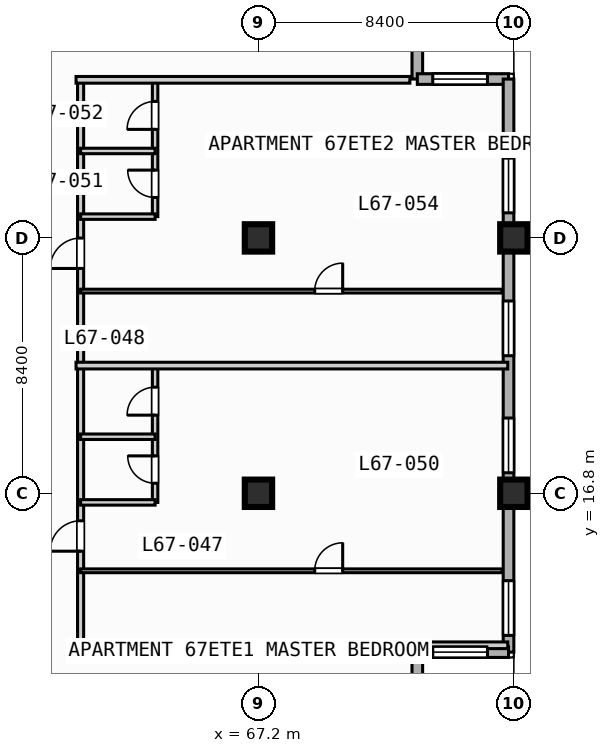
"""IFC4 building model, lengths in metres.
Left out: names, types, materials, properties, quantities, classifications, styles, units other than length and angle.
Written with IfcOpenShell. Run it as: python <this file> out.ifc"""

import sys

from ifc_helpers import new_model, si_unit, direction, frame, frame_2d, origin, origin_2d, place, context, subcontext, project, spatial, rectangle, extrude, element, fill, save


model = new_model("IFC4")
c1 = context("Model", 3, precision=1e-05, world=origin(), true_north=direction((0.0, 1.0)))
c2 = subcontext(c1, "Body", "Model", "MODEL_VIEW")
j1 = project(units=[si_unit("LENGTHUNIT", "METRE"), si_unit("PLANEANGLEUNIT", "RADIAN")], contexts=[c1])
p1 = place(None, origin())
s1 = spatial("IfcSite", under=j1, at=p1, CompositionType="ELEMENT")
p2 = place(p1, origin())
s2 = spatial("IfcBuilding", under=s1, at=p2, CompositionType="ELEMENT")
p3 = place(p2, frame((0.0, 0.0, 271.2)))
s3 = spatial("IfcBuildingStorey", under=s2, at=p3, CompositionType="ELEMENT", Elevation=271.2)
for number, where, z_axis, x_axis in (
    (1, (67.2, 16.8, 0.0), (0.0, 0.0, 1.0), (1.0, 0.0, 0.0)),
    (2, (67.2, 25.2, 0.0), (0.0, 0.0, 1.0), (1.0, 0.0, 0.0)),
    (3, (75.6, 16.8, 0.0), (0.0, 0.0, 1.0), (1.0, 0.0, 0.0)),
    (4, (75.6, 25.2, 0.0), (0.0, 0.0, 1.0), (1.0, 0.0, 0.0)),
):
    element("IfcColumn", number, at=place(p3, frame(where, z_axis=z_axis, x_axis=x_axis)), inside=s3, PredefinedType="COLUMN", context=c2, shape_type="SweptSolid", body=[
        extrude(rectangle(XDim=0.9, YDim=0.9, at=origin_2d()), origin(), (0.0, 0.0, 1.0), 3.7),
    ])
p4 = place(p3, frame((72.425, 33.425, 0.0), z_axis=(0.0, 0.0, 1.0), x_axis=(0.0, -1.0, 0.0)))
e5 = element("IfcWall", 5, at=p4, inside=s3, PredefinedType="STANDARD", context=c2, shape_type="SweptSolid", body=[
    extrude(rectangle(XDim=3.0, YDim=0.35, at=frame_2d((1.5, 0.0))), origin(), (0.0, 0.0, 1.0), 3.47),
])
p5 = place(p3, frame((72.425, 30.425, 0.0), z_axis=(0.0, 0.0, 1.0), x_axis=(1.0, 0.0, 0.0)))
e6 = element("IfcWall", 6, at=p5, inside=s3, PredefinedType="STANDARD", context=c2, shape_type="SweptSolid", body=[
    extrude(rectangle(XDim=3.0, YDim=0.35, at=frame_2d((1.5, 0.0))), origin(), (0.0, 0.0, 1.0), 3.47),
])
p6 = place(p5, frame((0.508, 0.0, 0.85)))
e7 = element("IfcOpeningElement", 7, at=p6, cuts=e6, PredefinedType="OPENING", context=c2, shape_type="SweptSolid", body=[
    extrude(rectangle(XDim=1.8, YDim=1.8, at=frame_2d((0.9, 0.9))), frame((0.0, 0.185, 0.0), z_axis=(0.0, -1.0, 0.0), x_axis=(1.0, 0.0, 0.0)), (0.0, 0.0, 1.0), 0.37),
])
p7 = place(p3, frame((75.425, 30.425, 0.0), z_axis=(0.0, 0.0, 1.0), x_axis=(0.0, -1.0, 0.0)))
e8 = element("IfcWall", 8, at=p7, inside=s3, PredefinedType="STANDARD", context=c2, shape_type="SweptSolid", body=[
    extrude(rectangle(XDim=18.85, YDim=0.35, at=frame_2d((9.425, 0.0))), origin(), (0.0, 0.0, 1.0), 3.47),
])
p8 = place(p7, frame((16.5, 0.0, 0.85)))
e9 = element("IfcOpeningElement", 9, at=p8, cuts=e8, PredefinedType="OPENING", context=c2, shape_type="SweptSolid", body=[
    extrude(rectangle(XDim=1.8, YDim=1.8, at=frame_2d((0.9, 0.9))), frame((0.0, 0.185, 0.0), z_axis=(0.0, -1.0, 0.0), x_axis=(1.0, 0.0, 0.0)), (0.0, 0.0, 1.0), 0.37),
])
p9 = place(p7, frame((11.15, 0.0, 0.85)))
e10 = element("IfcOpeningElement", 10, at=p9, cuts=e8, PredefinedType="OPENING", context=c2, shape_type="SweptSolid", body=[
    extrude(rectangle(XDim=1.8, YDim=1.8, at=frame_2d((0.9, 0.9))), frame((0.0, 0.185, 0.0), z_axis=(0.0, -1.0, 0.0), x_axis=(1.0, 0.0, 0.0)), (0.0, 0.0, 1.0), 0.37),
])
p10 = place(p7, frame((7.3, 0.0, 0.85)))
e11 = element("IfcOpeningElement", 11, at=p10, cuts=e8, PredefinedType="OPENING", context=c2, shape_type="SweptSolid", body=[
    extrude(rectangle(XDim=1.8, YDim=1.8, at=frame_2d((0.9, 0.9))), frame((0.0, 0.185, 0.0), z_axis=(0.0, -1.0, 0.0), x_axis=(1.0, 0.0, 0.0)), (0.0, 0.0, 1.0), 0.37),
])
p11 = place(p7, frame((2.6, 0.0, 0.85)))
e12 = element("IfcOpeningElement", 12, at=p11, cuts=e8, PredefinedType="OPENING", context=c2, shape_type="SweptSolid", body=[
    extrude(rectangle(XDim=1.8, YDim=1.8, at=frame_2d((0.9, 0.9))), frame((0.0, 0.185, 0.0), z_axis=(0.0, -1.0, 0.0), x_axis=(1.0, 0.0, 0.0)), (0.0, 0.0, 1.0), 0.37),
])
p12 = place(p3, frame((75.425, 11.575, 0.0), z_axis=(0.0, 0.0, 1.0), x_axis=(-1.0, 0.0, 0.0)))
e13 = element("IfcWall", 13, at=p12, inside=s3, PredefinedType="STANDARD", context=c2, shape_type="SweptSolid", body=[
    extrude(rectangle(XDim=3.0, YDim=0.35, at=frame_2d((1.5, 0.0))), origin(), (0.0, 0.0, 1.0), 3.47),
])
p13 = place(p12, frame((0.692, 0.0, 0.85)))
e14 = element("IfcOpeningElement", 14, at=p13, cuts=e13, PredefinedType="OPENING", context=c2, shape_type="SweptSolid", body=[
    extrude(rectangle(XDim=1.8, YDim=1.8, at=frame_2d((0.9, 0.9))), frame((0.0, 0.185, 0.0), z_axis=(0.0, -1.0, 0.0), x_axis=(1.0, 0.0, 0.0)), (0.0, 0.0, 1.0), 0.37),
])
p14 = place(p3, frame((72.425, 11.575, 0.0), z_axis=(0.0, 0.0, 1.0), x_axis=(0.0, -1.0, 0.0)))
e15 = element("IfcWall", 15, at=p14, inside=s3, PredefinedType="STANDARD", context=c2, shape_type="SweptSolid", body=[
    extrude(rectangle(XDim=3.0, YDim=0.35, at=frame_2d((1.5, 0.0))), origin(), (0.0, 0.0, 1.0), 3.47),
])
p15 = place(p3, frame((61.35, 11.8, 0.0), z_axis=(0.0, 0.0, 1.0), x_axis=(0.0, 1.0, 0.0)))
e16 = element("IfcWall", 16, at=p15, inside=s3, PredefinedType="PARTITIONING", context=c2, shape_type="SweptSolid", body=[
    extrude(rectangle(XDim=18.6, YDim=0.2, at=frame_2d((9.3, 0.0))), origin(), (0.0, 0.0, 1.0), 3.47),
])
p16 = place(p15, frame((3.095, 0.0, 0.0)))
e17 = element("IfcOpeningElement", 17, at=p16, cuts=e16, PredefinedType="OPENING", context=c2, shape_type="SweptSolid", body=[
    extrude(rectangle(XDim=1.0, YDim=2.15, at=frame_2d((0.5, 1.075))), frame((0.0, 0.11, 0.0), z_axis=(0.0, -1.0, 0.0), x_axis=(1.0, 0.0, 0.0)), (0.0, 0.0, 1.0), 0.22),
])
p17 = place(p15, frame((12.395, 0.0, 0.0)))
e18 = element("IfcOpeningElement", 18, at=p17, cuts=e16, PredefinedType="OPENING", context=c2, shape_type="SweptSolid", body=[
    extrude(rectangle(XDim=1.0, YDim=2.15, at=frame_2d((0.5, 1.075))), frame((0.0, 0.11, 0.0), z_axis=(0.0, -1.0, 0.0), x_axis=(1.0, 0.0, 0.0)), (0.0, 0.0, 1.0), 0.22),
])
p18 = place(p3, frame((61.2, 11.8, 0.0), z_axis=(0.0, 0.0, 1.0), x_axis=(1.0, 0.0, 0.0)))
e19 = element("IfcWall", 19, at=p18, inside=s3, PredefinedType="PARTITIONING", context=c2, shape_type="SweptSolid", body=[
    extrude(rectangle(XDim=14.2, YDim=0.22, at=frame_2d((7.1, 0.0))), origin(), (0.0, 0.0, 1.0), 3.47),
])
p19 = place(p3, frame((63.8, 16.5, 0.0), z_axis=(0.0, 0.0, 1.0), x_axis=(0.0, 1.0, 0.0)))
e20 = element("IfcWall", 20, at=p19, inside=s3, PredefinedType="PLUMBINGWALL", context=c2, shape_type="SweptSolid", body=[
    extrude(rectangle(XDim=4.5, YDim=0.18, at=frame_2d((2.25, 0.0))), origin(), (0.0, 0.0, 1.0), 3.47),
])
p20 = place(p19, frame((0.63, 0.0, 0.0)))
e21 = element("IfcOpeningElement", 21, at=p20, cuts=e20, PredefinedType="OPENING", context=c2, shape_type="SweptSolid", body=[
    extrude(rectangle(XDim=0.9, YDim=2.1, at=frame_2d((0.45, 1.05))), frame((0.0, 0.1, 0.0), z_axis=(0.0, -1.0, 0.0), x_axis=(1.0, 0.0, 0.0)), (0.0, 0.0, 1.0), 0.2),
])
p21 = place(p19, frame((2.87, 0.0, 0.0)))
e22 = element("IfcOpeningElement", 22, at=p21, cuts=e20, PredefinedType="OPENING", context=c2, shape_type="SweptSolid", body=[
    extrude(rectangle(XDim=0.92, YDim=2.1, at=frame_2d((0.46, 1.05))), frame((0.0, 0.1, 0.0), z_axis=(0.0, -1.0, 0.0), x_axis=(1.0, 0.0, 0.0)), (0.0, 0.0, 1.0), 0.2),
])
p22 = place(p3, frame((61.35, 16.5, 0.0), z_axis=(0.0, 0.0, 1.0), x_axis=(1.0, 0.0, 0.0)))
e23 = element("IfcWall", 23, at=p22, inside=s3, PredefinedType="PLUMBINGWALL", context=c2, shape_type="SweptSolid", body=[
    extrude(rectangle(XDim=2.45, YDim=0.18, at=frame_2d((1.225, 0.0))), origin(), (0.0, 0.0, 1.0), 2.82),
])
p23 = place(p3, frame((61.35, 18.66, 0.0), z_axis=(0.0, 0.0, 1.0), x_axis=(1.0, 0.0, 0.0)))
e24 = element("IfcWall", 24, at=p23, inside=s3, PredefinedType="PLUMBINGWALL", context=c2, shape_type="SweptSolid", body=[
    extrude(rectangle(XDim=2.45, YDim=0.18, at=frame_2d((1.225, 0.0))), origin(), (0.0, 0.0, 1.0), 3.47),
])
p24 = place(p3, frame((61.35, 14.25, 0.0), z_axis=(0.0, 0.0, 1.0), x_axis=(1.0, 0.0, 0.0)))
e25 = element("IfcWall", 25, at=p24, inside=s3, PredefinedType="PARTITIONING", context=c2, shape_type="SweptSolid", body=[
    extrude(rectangle(XDim=13.87, YDim=0.125, at=frame_2d((6.935, 0.0))), origin(), (0.0, 0.0, 1.0), 3.47),
])
p25 = place(p24, frame((7.7, 0.0, 0.0)))
e26 = element("IfcOpeningElement", 26, at=p25, cuts=e25, PredefinedType="OPENING", context=c2, shape_type="SweptSolid", body=[
    extrude(rectangle(XDim=0.92, YDim=2.1, at=frame_2d((0.46, 1.05))), frame((0.0, 0.073, 0.0), z_axis=(0.0, -1.0, 0.0), x_axis=(1.0, 0.0, 0.0)), (0.0, 0.0, 1.0), 0.145),
])
p26 = place(p3, frame((61.2, 21.0, 0.0), z_axis=(0.0, 0.0, 1.0), x_axis=(1.0, 0.0, 0.0)))
e27 = element("IfcWall", 27, at=p26, inside=s3, PredefinedType="PARTITIONING", context=c2, shape_type="SweptSolid", body=[
    extrude(rectangle(XDim=14.2, YDim=0.22, at=frame_2d((7.1, 0.0))), origin(), (0.0, 0.0, 1.0), 3.47),
])
p27 = place(p3, frame((63.8, 25.9, 0.0), z_axis=(0.0, 0.0, 1.0), x_axis=(0.0, 1.0, 0.0)))
e28 = element("IfcWall", 28, at=p27, inside=s3, PredefinedType="PLUMBINGWALL", context=c2, shape_type="SweptSolid", body=[
    extrude(rectangle(XDim=4.5, YDim=0.18, at=frame_2d((2.25, 0.0))), origin(), (0.0, 0.0, 1.0), 3.47),
])
p28 = place(p27, frame((0.63, 0.0, 0.0)))
e29 = element("IfcOpeningElement", 29, at=p28, cuts=e28, PredefinedType="OPENING", context=c2, shape_type="SweptSolid", body=[
    extrude(rectangle(XDim=0.9, YDim=2.1, at=frame_2d((0.45, 1.05))), frame((0.0, 0.1, 0.0), z_axis=(0.0, -1.0, 0.0), x_axis=(1.0, 0.0, 0.0)), (0.0, 0.0, 1.0), 0.2),
])
p29 = place(p27, frame((2.87, 0.0, 0.0)))
e30 = element("IfcOpeningElement", 30, at=p29, cuts=e28, PredefinedType="OPENING", context=c2, shape_type="SweptSolid", body=[
    extrude(rectangle(XDim=0.92, YDim=2.1, at=frame_2d((0.46, 1.05))), frame((0.0, 0.1, 0.0), z_axis=(0.0, -1.0, 0.0), x_axis=(1.0, 0.0, 0.0)), (0.0, 0.0, 1.0), 0.2),
])
for number, where, z_axis, x_axis in (
    (31, (61.35, 25.9, 0.0), (0.0, 0.0, 1.0), (1.0, 0.0, 0.0)),
    (32, (61.35, 28.06, 0.0), (0.0, 0.0, 1.0), (1.0, 0.0, 0.0)),
):
    element("IfcWall", number, at=place(p3, frame(where, z_axis=z_axis, x_axis=x_axis)), inside=s3, PredefinedType="PLUMBINGWALL", context=c2, shape_type="SweptSolid", body=[
        extrude(rectangle(XDim=2.45, YDim=0.18, at=frame_2d((1.225, 0.0))), origin(), (0.0, 0.0, 1.0), 3.47),
    ])
p30 = place(p3, frame((61.35, 23.45, 0.0), z_axis=(0.0, 0.0, 1.0), x_axis=(1.0, 0.0, 0.0)))
e33 = element("IfcWall", 33, at=p30, inside=s3, PredefinedType="PARTITIONING", context=c2, shape_type="SweptSolid", body=[
    extrude(rectangle(XDim=13.87, YDim=0.125, at=frame_2d((6.935, 0.0))), origin(), (0.0, 0.0, 1.0), 3.47),
])
p31 = place(p30, frame((7.7, 0.0, 0.0)))
e34 = element("IfcOpeningElement", 34, at=p31, cuts=e33, PredefinedType="OPENING", context=c2, shape_type="SweptSolid", body=[
    extrude(rectangle(XDim=0.92, YDim=2.1, at=frame_2d((0.46, 1.05))), frame((0.0, 0.073, 0.0), z_axis=(0.0, -1.0, 0.0), x_axis=(1.0, 0.0, 0.0)), (0.0, 0.0, 1.0), 0.145),
])
p32 = place(p3, frame((61.2, 30.4, 0.0), z_axis=(0.0, 0.0, 1.0), x_axis=(1.0, 0.0, 0.0)))
e35 = element("IfcWall", 35, at=p32, inside=s3, PredefinedType="PARTITIONING", context=c2, shape_type="SweptSolid", body=[
    extrude(rectangle(XDim=10.98, YDim=0.22, at=frame_2d((5.49, 0.0))), origin(), (0.0, 0.0, 1.0), 3.47),
])
p33 = place(p6, origin())
e36 = element("IfcWindow", 36, at=p33, inside=s3, PartitioningType="SINGLE_PANEL", PredefinedType="WINDOW", context=c2, shape_type="SweptSolid", body=[
    extrude(rectangle(XDim=1.8, YDim=1.8, at=frame_2d((0.9, 0.9))), frame((0.0, 0.03, 0.0), z_axis=(0.0, -1.0, 0.0), x_axis=(1.0, 0.0, 0.0)), (0.0, 0.0, 1.0), 0.06),
])
fill(e7, e36)
p34 = place(p8, origin())
e37 = element("IfcWindow", 37, at=p34, inside=s3, PartitioningType="SINGLE_PANEL", PredefinedType="WINDOW", context=c2, shape_type="SweptSolid", body=[
    extrude(rectangle(XDim=1.8, YDim=1.8, at=frame_2d((0.9, 0.9))), frame((0.0, 0.03, 0.0), z_axis=(0.0, -1.0, 0.0), x_axis=(1.0, 0.0, 0.0)), (0.0, 0.0, 1.0), 0.06),
])
fill(e9, e37)
p35 = place(p9, origin())
e38 = element("IfcWindow", 38, at=p35, inside=s3, PartitioningType="SINGLE_PANEL", PredefinedType="WINDOW", context=c2, shape_type="SweptSolid", body=[
    extrude(rectangle(XDim=1.8, YDim=1.8, at=frame_2d((0.9, 0.9))), frame((0.0, 0.03, 0.0), z_axis=(0.0, -1.0, 0.0), x_axis=(1.0, 0.0, 0.0)), (0.0, 0.0, 1.0), 0.06),
])
fill(e10, e38)
p36 = place(p10, origin())
e39 = element("IfcWindow", 39, at=p36, inside=s3, PartitioningType="SINGLE_PANEL", PredefinedType="WINDOW", context=c2, shape_type="SweptSolid", body=[
    extrude(rectangle(XDim=1.8, YDim=1.8, at=frame_2d((0.9, 0.9))), frame((0.0, 0.03, 0.0), z_axis=(0.0, -1.0, 0.0), x_axis=(1.0, 0.0, 0.0)), (0.0, 0.0, 1.0), 0.06),
])
fill(e11, e39)
p37 = place(p11, origin())
e40 = element("IfcWindow", 40, at=p37, inside=s3, PartitioningType="SINGLE_PANEL", PredefinedType="WINDOW", context=c2, shape_type="SweptSolid", body=[
    extrude(rectangle(XDim=1.8, YDim=1.8, at=frame_2d((0.9, 0.9))), frame((0.0, 0.03, 0.0), z_axis=(0.0, -1.0, 0.0), x_axis=(1.0, 0.0, 0.0)), (0.0, 0.0, 1.0), 0.06),
])
fill(e12, e40)
p38 = place(p13, origin())
e41 = element("IfcWindow", 41, at=p38, inside=s3, PartitioningType="SINGLE_PANEL", PredefinedType="WINDOW", context=c2, shape_type="SweptSolid", body=[
    extrude(rectangle(XDim=1.8, YDim=1.8, at=frame_2d((0.9, 0.9))), frame((0.0, 0.03, 0.0), z_axis=(0.0, -1.0, 0.0), x_axis=(1.0, 0.0, 0.0)), (0.0, 0.0, 1.0), 0.06),
])
fill(e14, e41)
p39 = place(p16, origin())
e42 = element("IfcDoor", 42, at=p39, inside=s3, OperationType="SINGLE_SWING_LEFT", PredefinedType="DOOR", context=c2, shape_type="SweptSolid", body=[
    extrude(rectangle(XDim=1.0, YDim=2.15, at=frame_2d((0.5, 1.075))), frame((0.0, 0.025, 0.0), z_axis=(0.0, -1.0, 0.0), x_axis=(1.0, 0.0, 0.0)), (0.0, 0.0, 1.0), 0.05),
])
fill(e17, e42)
p40 = place(p17, origin())
e43 = element("IfcDoor", 43, at=p40, inside=s3, OperationType="SINGLE_SWING_LEFT", PredefinedType="DOOR", context=c2, shape_type="SweptSolid", body=[
    extrude(rectangle(XDim=1.0, YDim=2.15, at=frame_2d((0.5, 1.075))), frame((0.0, 0.025, 0.0), z_axis=(0.0, -1.0, 0.0), x_axis=(1.0, 0.0, 0.0)), (0.0, 0.0, 1.0), 0.05),
])
fill(e18, e43)
p41 = place(p20, origin())
e44 = element("IfcDoor", 44, at=p41, inside=s3, OperationType="SINGLE_SWING_RIGHT", PredefinedType="DOOR", context=c2, shape_type="SweptSolid", body=[
    extrude(rectangle(XDim=0.9, YDim=2.1, at=frame_2d((0.45, 1.05))), frame((0.0, 0.025, 0.0), z_axis=(0.0, -1.0, 0.0), x_axis=(1.0, 0.0, 0.0)), (0.0, 0.0, 1.0), 0.05),
])
fill(e21, e44)
p42 = place(p21, origin())
e45 = element("IfcDoor", 45, at=p42, inside=s3, OperationType="SINGLE_SWING_LEFT", PredefinedType="DOOR", context=c2, shape_type="SweptSolid", body=[
    extrude(rectangle(XDim=0.92, YDim=2.1, at=frame_2d((0.46, 1.05))), frame((0.0, 0.025, 0.0), z_axis=(0.0, -1.0, 0.0), x_axis=(1.0, 0.0, 0.0)), (0.0, 0.0, 1.0), 0.05),
])
fill(e22, e45)
p43 = place(p25, origin())
e46 = element("IfcDoor", 46, at=p43, inside=s3, OperationType="SINGLE_SWING_RIGHT", PredefinedType="DOOR", context=c2, shape_type="SweptSolid", body=[
    extrude(rectangle(XDim=0.92, YDim=2.1, at=frame_2d((0.46, 1.05))), frame((0.0, 0.025, 0.0), z_axis=(0.0, -1.0, 0.0), x_axis=(1.0, 0.0, 0.0)), (0.0, 0.0, 1.0), 0.05),
])
fill(e26, e46)
p44 = place(p28, origin())
e47 = element("IfcDoor", 47, at=p44, inside=s3, OperationType="SINGLE_SWING_RIGHT", PredefinedType="DOOR", context=c2, shape_type="SweptSolid", body=[
    extrude(rectangle(XDim=0.9, YDim=2.1, at=frame_2d((0.45, 1.05))), frame((0.0, 0.025, 0.0), z_axis=(0.0, -1.0, 0.0), x_axis=(1.0, 0.0, 0.0)), (0.0, 0.0, 1.0), 0.05),
])
fill(e29, e47)
p45 = place(p29, origin())
e48 = element("IfcDoor", 48, at=p45, inside=s3, OperationType="SINGLE_SWING_LEFT", PredefinedType="DOOR", context=c2, shape_type="SweptSolid", body=[
    extrude(rectangle(XDim=0.92, YDim=2.1, at=frame_2d((0.46, 1.05))), frame((0.0, 0.025, 0.0), z_axis=(0.0, -1.0, 0.0), x_axis=(1.0, 0.0, 0.0)), (0.0, 0.0, 1.0), 0.05),
])
fill(e30, e48)
p46 = place(p31, origin())
e49 = element("IfcDoor", 49, at=p46, inside=s3, OperationType="SINGLE_SWING_RIGHT", PredefinedType="DOOR", context=c2, shape_type="SweptSolid", body=[
    extrude(rectangle(XDim=0.92, YDim=2.1, at=frame_2d((0.46, 1.05))), frame((0.0, 0.025, 0.0), z_axis=(0.0, -1.0, 0.0), x_axis=(1.0, 0.0, 0.0)), (0.0, 0.0, 1.0), 0.05),
])
fill(e34, e49)
save(model, sys.argv[1])
